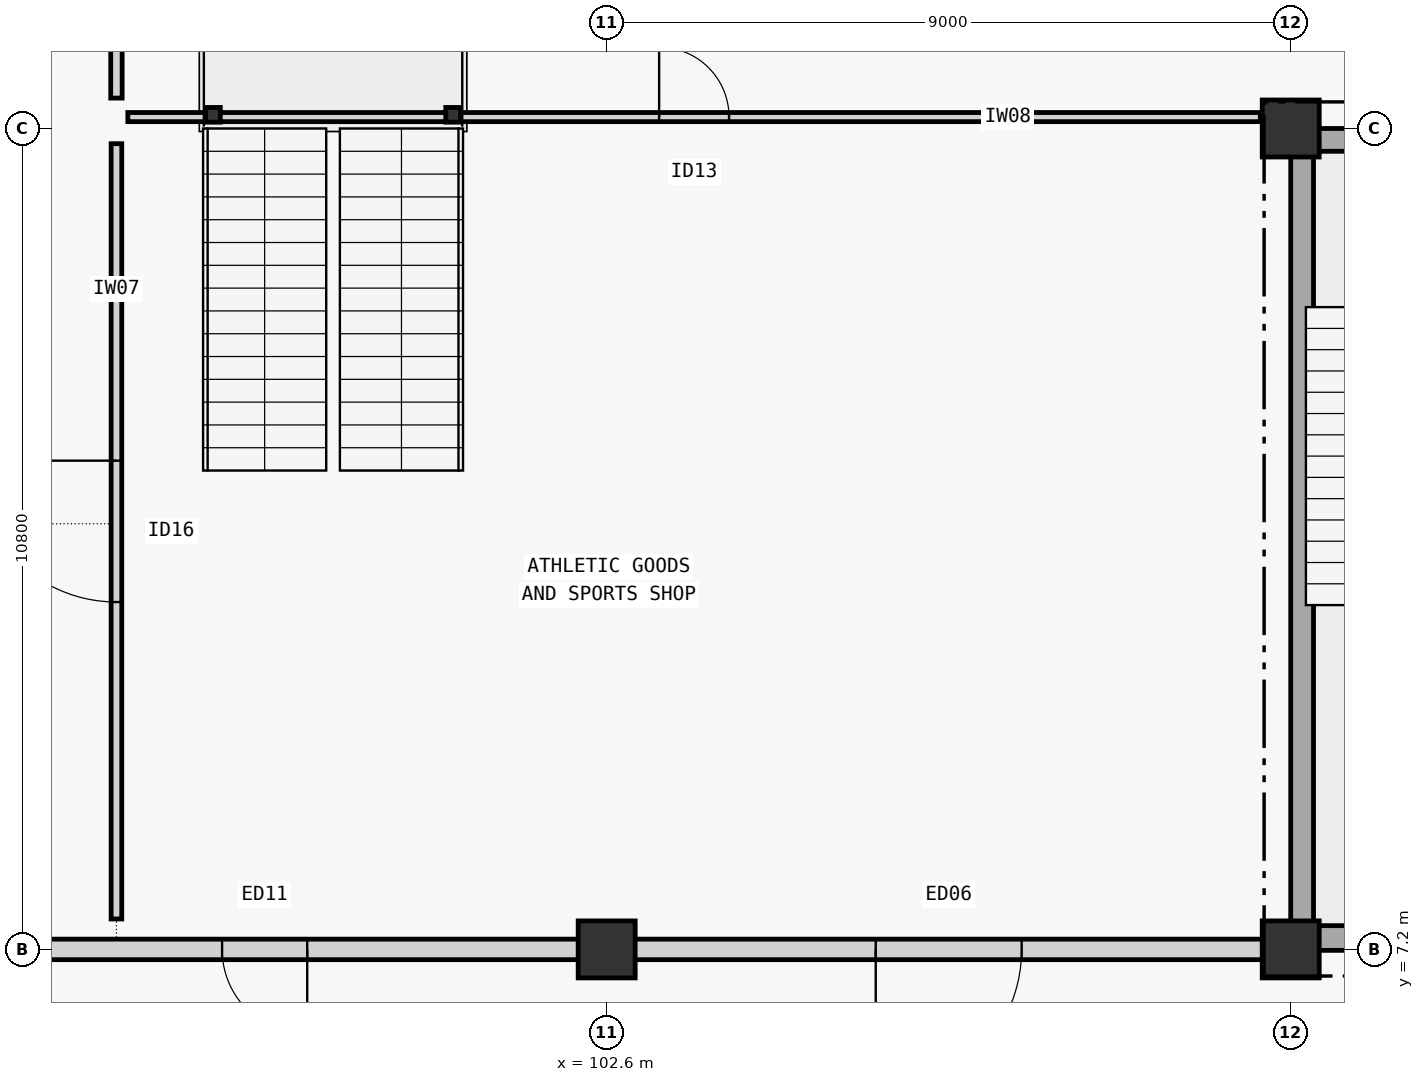
"""IFC4 building model, lengths in metres.
Left out: names, types, materials, properties, quantities, classifications, styles, units other than length and angle.
Written with IfcOpenShell. Run it as: python <this file> out.ifc"""

import sys

from ifc_helpers import new_model, si_unit, direction, frame, frame_2d, origin, origin_2d, place, context, subcontext, project, spatial, rectangle, circle, hollow_circle, extrude, element, fill, save


model = new_model("IFC4")
c1 = context("Model", 3, precision=1e-05, world=origin(), true_north=direction((0.0, 1.0)))
c2 = subcontext(c1, "Body", "Model", "MODEL_VIEW")
j1 = project(units=[si_unit("LENGTHUNIT", "METRE"), si_unit("PLANEANGLEUNIT", "RADIAN")], contexts=[c1])
p1 = place(None, origin())
s1 = spatial("IfcSite", under=j1, at=p1, CompositionType="ELEMENT")
p2 = place(p1, origin())
s2 = spatial("IfcBuilding", under=s1, at=p2, CompositionType="ELEMENT")
p3 = place(p2, origin())
s3 = spatial("IfcBuildingStorey", under=s2, at=p3, CompositionType="ELEMENT", Elevation=0.0)
for number, where, z_axis, x_axis in (
    (1, (102.6, 7.2, -0.3), (0.0, 0.0, 1.0), (1.0, 0.0, 0.0)),
    (2, (111.6, 7.2, -0.3), (0.0, 0.0, 1.0), (1.0, 0.0, 0.0)),
    (3, (111.6, 18.0, -0.3), (0.0, 0.0, 1.0), (1.0, 0.0, 0.0)),
):
    element("IfcColumn", number, at=place(p3, frame(where, z_axis=z_axis, x_axis=x_axis)), inside=s3, PredefinedType="COLUMN", context=c2, shape_type="SweptSolid", body=[
        extrude(circle(Radius=0.375, at=origin_2d()), origin(), (0.0, 0.0, 1.0), 5.7),
    ])
p4 = place(p3, frame((118.8, 7.35, 0.0), z_axis=(0.0, 0.0, 1.0), x_axis=(-1.0, 0.0, 0.0)))
e4 = element("IfcWall", 4, at=p4, inside=s3, PredefinedType="SHEAR", context=c2, shape_type="SweptSolid", body=[
    extrude(rectangle(XDim=7.2, YDim=0.325, at=frame_2d((3.6, 0.0))), origin(), (0.0, 0.0, 1.0), 5.4),
])
p5 = place(p4, frame((3.9, 0.0, 0.0)))
e5 = element("IfcOpeningElement", 5, at=p5, cuts=e4, PredefinedType="OPENING", context=c2, shape_type="SweptSolid", body=[
    extrude(rectangle(XDim=1.82, YDim=2.22, at=frame_2d((0.91, 1.11))), frame((0.0, 0.163, 0.0), z_axis=(0.0, -1.0, 0.0), x_axis=(1.0, 0.0, 0.0)), (0.0, 0.0, 1.0), 0.325),
])
p6 = place(p3, frame((111.6, 17.85, 0.0), z_axis=(0.0, 0.0, 1.0), x_axis=(1.0, 0.0, 0.0)))
e6 = element("IfcWall", 6, at=p6, inside=s3, PredefinedType="SHEAR", context=c2, shape_type="SweptSolid", body=[
    extrude(rectangle(XDim=7.2, YDim=0.3, at=frame_2d((3.6, 0.0))), origin(), (0.0, 0.0, 1.0), 5.4),
])
p7 = place(p6, frame((4.65, 0.0, 0.0)))
e7 = element("IfcOpeningElement", 7, at=p7, cuts=e6, PredefinedType="OPENING", context=c2, shape_type="SweptSolid", body=[
    extrude(rectangle(XDim=1.54, YDim=2.22, at=frame_2d((0.77, 1.11))), frame((0.0, 0.15, 0.0), z_axis=(0.0, -1.0, 0.0), x_axis=(1.0, 0.0, 0.0)), (0.0, 0.0, 1.0), 0.3),
])
p8 = place(p3, frame((111.75, 7.5, 0.0), z_axis=(0.0, 0.0, 1.0), x_axis=(0.0, 1.0, 0.0)))
e8 = element("IfcWall", 8, at=p8, inside=s3, PredefinedType="SHEAR", context=c2, shape_type="SweptSolid", body=[
    extrude(rectangle(XDim=10.2, YDim=0.3, at=frame_2d((5.1, 0.0))), origin(), (0.0, 0.0, 1.0), 5.4),
])
p9 = place(p3, frame((102.238, 7.2, 0.0), z_axis=(0.0, 0.0, 1.0), x_axis=(-1.0, 0.0, 0.0)))
e9 = element("IfcWall", 9, at=p9, inside=s3, PredefinedType="STANDARD", context=c2, shape_type="SweptSolid", body=[
    extrude(rectangle(XDim=8.276, YDim=0.27, at=frame_2d((4.138, 0.0))), origin(), (0.0, 0.0, 1.0), 4.515),
])
p10 = place(p9, frame((3.578, 0.0, 0.0)))
e10 = element("IfcOpeningElement", 10, at=p10, cuts=e9, PredefinedType="OPENING", context=c2, shape_type="SweptSolid", body=[
    extrude(rectangle(XDim=1.12, YDim=2.22, at=frame_2d((0.56, 1.11))), frame((0.0, 0.135, 0.0), z_axis=(0.0, -1.0, 0.0), x_axis=(1.0, 0.0, 0.0)), (0.0, 0.0, 1.0), 0.27),
])
p11 = place(p3, frame((111.238, 7.2, 0.0), z_axis=(0.0, 0.0, 1.0), x_axis=(-1.0, 0.0, 0.0)))
e11 = element("IfcWall", 11, at=p11, inside=s3, PredefinedType="STANDARD", context=c2, shape_type="SweptSolid", body=[
    extrude(rectangle(XDim=8.276, YDim=0.27, at=frame_2d((4.138, 0.0))), origin(), (0.0, 0.0, 1.0), 4.515),
])
p12 = place(p11, frame((3.178, 0.0, 0.0)))
e12 = element("IfcOpeningElement", 12, at=p12, cuts=e11, PredefinedType="OPENING", context=c2, shape_type="SweptSolid", body=[
    extrude(rectangle(XDim=1.92, YDim=2.42, at=frame_2d((0.96, 1.21))), frame((0.0, 0.135, 0.0), z_axis=(0.0, -1.0, 0.0), x_axis=(1.0, 0.0, 0.0)), (0.0, 0.0, 1.0), 0.27),
])
for number, where, z_axis, x_axis in (
    (13, (97.42, 18.18, -0.3), (0.0, 0.0, 1.0), (1.0, 0.0, 0.0)),
    (14, (100.58, 18.18, -0.3), (0.0, 0.0, 1.0), (1.0, 0.0, 0.0)),
):
    element("IfcColumn", number, at=place(p3, frame(where, z_axis=z_axis, x_axis=x_axis)), inside=s3, PredefinedType="COLUMN", context=c2, shape_type="SweptSolid", body=[
        extrude(hollow_circle(Radius=0.097, WallThickness=0.01, at=origin_2d()), origin(), (0.0, 0.0, 1.0), 2.782),
    ])
p13 = place(p3, frame((96.15, 18.4, 0.0), z_axis=(0.0, 0.0, 1.0), x_axis=(0.0, 1.0, 0.0)))
e15 = element("IfcWall", 15, at=p13, inside=s3, PredefinedType="STANDARD", context=c2, shape_type="SweptSolid", body=[
    extrude(rectangle(XDim=10.0, YDim=0.15, at=frame_2d((5.0, 0.0))), origin(), (0.0, 0.0, 1.0), 4.2),
])
p14 = place(p13, frame((4.12, 0.0, 0.0)))
e16 = element("IfcOpeningElement", 16, at=p14, cuts=e15, PredefinedType="OPENING", context=c2, shape_type="SweptSolid", body=[
    extrude(rectangle(XDim=1.76, YDim=2.3, at=frame_2d((0.88, 1.15))), frame((0.0, 0.075, 0.0), z_axis=(0.0, -1.0, 0.0), x_axis=(1.0, 0.0, 0.0)), (0.0, 0.0, 1.0), 0.15),
])
p15 = place(p3, frame((96.15, 7.6, 0.0), z_axis=(0.0, 0.0, 1.0), x_axis=(0.0, 1.0, 0.0)))
e17 = element("IfcWall", 17, at=p15, inside=s3, PredefinedType="STANDARD", context=c2, shape_type="SweptSolid", body=[
    extrude(rectangle(XDim=10.2, YDim=0.14, at=frame_2d((5.1, 0.0))), origin(), (0.0, 0.0, 1.0), 4.2),
])
p16 = place(p15, frame((4.17, 0.0, 0.0)))
e18 = element("IfcOpeningElement", 18, at=p16, cuts=e17, PredefinedType="OPENING", context=c2, shape_type="SweptSolid", body=[
    extrude(rectangle(XDim=1.86, YDim=2.32, at=frame_2d((0.93, 1.16))), frame((0.0, 0.07, 0.0), z_axis=(0.0, -1.0, 0.0), x_axis=(1.0, 0.0, 0.0)), (0.0, 0.0, 1.0), 0.14),
])
p17 = place(p3, frame((96.3, 18.15, 0.0), z_axis=(0.0, 0.0, 1.0), x_axis=(1.0, 0.0, 0.0)))
e19 = element("IfcWall", 19, at=p17, inside=s3, PredefinedType="STANDARD", context=c2, shape_type="SweptSolid", body=[
    extrude(rectangle(XDim=14.9, YDim=0.12, at=frame_2d((7.45, 0.0))), origin(), (0.0, 0.0, 1.0), 2.197),
])
p18 = place(p17, frame((6.99, 0.0, 0.0)))
e20 = element("IfcOpeningElement", 20, at=p18, cuts=e19, PredefinedType="OPENING", context=c2, shape_type="SweptSolid", body=[
    extrude(rectangle(XDim=0.92, YDim=2.12, at=frame_2d((0.46, 1.06))), frame((0.0, 0.06, 0.0), z_axis=(0.0, -1.0, 0.0), x_axis=(1.0, 0.0, 0.0)), (0.0, 0.0, 1.0), 0.12),
])
p19 = place(p10, origin())
e21 = element("IfcDoor", 21, at=p19, inside=s3, OperationType="SINGLE_SWING_LEFT", PredefinedType="DOOR", context=c2, shape_type="SweptSolid", body=[
    extrude(rectangle(XDim=1.12, YDim=2.22, at=frame_2d((0.56, 1.11))), frame((0.0, 0.025, 0.0), z_axis=(0.0, -1.0, 0.0), x_axis=(1.0, 0.0, 0.0)), (0.0, 0.0, 1.0), 0.05),
])
fill(e10, e21)
p20 = place(p12, origin())
e22 = element("IfcDoor", 22, at=p20, inside=s3, OperationType="SINGLE_SWING_RIGHT", PredefinedType="DOOR", context=c2, shape_type="SweptSolid", body=[
    extrude(rectangle(XDim=1.92, YDim=2.42, at=frame_2d((0.96, 1.21))), frame((0.0, 0.025, 0.0), z_axis=(0.0, -1.0, 0.0), x_axis=(1.0, 0.0, 0.0)), (0.0, 0.0, 1.0), 0.05),
])
fill(e12, e22)
p21 = place(p16, origin())
e23 = element("IfcDoor", 23, at=p21, inside=s3, OperationType="SINGLE_SWING_RIGHT", PredefinedType="DOOR", context=c2, shape_type="SweptSolid", body=[
    extrude(rectangle(XDim=1.86, YDim=2.32, at=frame_2d((0.93, 1.16))), frame((0.0, 0.025, 0.0), z_axis=(0.0, -1.0, 0.0), x_axis=(1.0, 0.0, 0.0)), (0.0, 0.0, 1.0), 0.05),
])
fill(e18, e23)
p22 = place(p18, origin())
e24 = element("IfcDoor", 24, at=p22, inside=s3, OperationType="SINGLE_SWING_LEFT", PredefinedType="DOOR", context=c2, shape_type="SweptSolid", body=[
    extrude(rectangle(XDim=0.92, YDim=2.12, at=frame_2d((0.46, 1.06))), frame((0.0, 0.025, 0.0), z_axis=(0.0, -1.0, 0.0), x_axis=(1.0, 0.0, 0.0)), (0.0, 0.0, 1.0), 0.05),
])
fill(e20, e24)
save(model, sys.argv[1])
